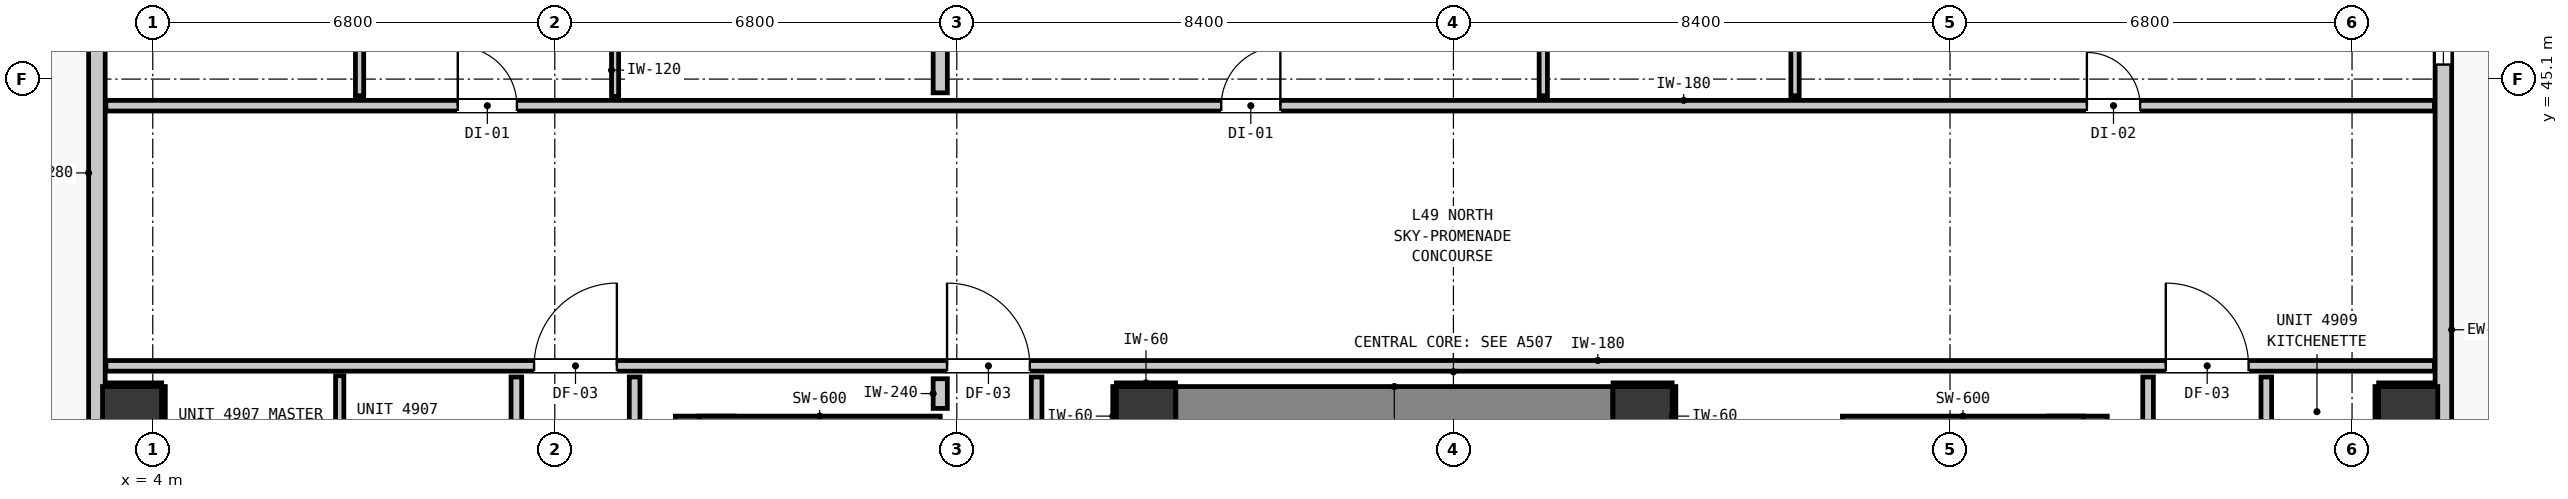
"""IFC4 building model, lengths in metres.
Left out: names, types, materials, properties, quantities, classifications, styles, units other than length and angle.
Written with IfcOpenShell. Run it as: python <this file> out.ifc"""

import sys

from ifc_helpers import new_model, si_unit, direction, frame, frame_2d, origin, origin_2d, place, context, subcontext, project, spatial, rectangle, extrude, element, fill, save


model = new_model("IFC4")
c1 = context("Model", 3, precision=1e-05, world=origin(), true_north=direction((0.0, 1.0)))
c2 = subcontext(c1, "Body", "Model", "MODEL_VIEW")
j1 = project(units=[si_unit("LENGTHUNIT", "METRE"), si_unit("PLANEANGLEUNIT", "RADIAN")], contexts=[c1])
p1 = place(None, origin())
s1 = spatial("IfcSite", under=j1, at=p1, CompositionType="ELEMENT")
p2 = place(p1, origin())
s2 = spatial("IfcBuilding", under=s1, at=p2, CompositionType="ELEMENT")
p3 = place(p2, frame((0.0, 0.0, 169.16)))
s3 = spatial("IfcBuildingStorey", under=s2, at=p3, CompositionType="ELEMENT", Elevation=169.16)
for number, where, z_axis, x_axis in (
    (1, (20.8, 39.4, 0.0), (0.0, 0.0, 1.0), (1.0, 0.0, 0.0)),
    (2, (29.2, 39.4, 0.0), (0.0, 0.0, 1.0), (1.0, 0.0, 0.0)),
):
    element("IfcColumn", number, at=place(p3, frame(where, z_axis=z_axis, x_axis=x_axis)), inside=s3, PredefinedType="COLUMN", context=c2, shape_type="SweptSolid", body=[
        extrude(rectangle(XDim=1.0, YDim=1.0, at=origin_2d()), origin(), (0.0, 0.0, 1.0), 3.32),
    ])
p4 = place(p3, frame((13.34, 31.205, 0.0), z_axis=(0.0, 0.0, 1.0), x_axis=(0.0, 1.0, 0.0)))
e3 = element("IfcWall", 3, at=p4, inside=s3, PredefinedType="SHEAR", context=c2, shape_type="SweptSolid", body=[
    extrude(rectangle(XDim=8.195, YDim=1.0, at=frame_2d((4.097, 0.0))), origin(), (0.0, 0.0, 1.0), 3.32),
])
p5 = place(p3, frame((13.24, 39.1, 0.0), z_axis=(0.0, 0.0, 1.0), x_axis=(1.0, 0.0, 0.0)))
e4 = element("IfcWall", 4, at=p5, inside=s3, PredefinedType="SHEAR", context=c2, shape_type="SweptSolid", body=[
    extrude(rectangle(XDim=4.08, YDim=0.6, at=frame_2d((2.04, 0.0))), origin(), (0.0, 0.0, 1.0), 3.32),
])
p6 = place(p3, frame((36.56, 31.205, 0.0), z_axis=(0.0, 0.0, 1.0), x_axis=(0.0, 1.0, 0.0)))
e5 = element("IfcWall", 5, at=p6, inside=s3, PredefinedType="SHEAR", context=c2, shape_type="SweptSolid", body=[
    extrude(rectangle(XDim=8.195, YDim=1.0, at=frame_2d((4.097, 0.0))), origin(), (0.0, 0.0, 1.0), 3.32),
])
p7 = place(p3, frame((32.58, 39.1, 0.0), z_axis=(0.0, 0.0, 1.0), x_axis=(1.0, 0.0, 0.0)))
e6 = element("IfcWall", 6, at=p7, inside=s3, PredefinedType="SHEAR", context=c2, shape_type="SweptSolid", body=[
    extrude(rectangle(XDim=4.08, YDim=0.6, at=frame_2d((2.04, 0.0))), origin(), (0.0, 0.0, 1.0), 3.32),
])
p8 = place(p3, frame((21.305, 39.4, 0.0), z_axis=(0.0, 0.0, 1.0), x_axis=(1.0, 0.0, 0.0)))
e7 = element("IfcWall", 7, at=p8, inside=s3, PredefinedType="SHEAR", context=c2, shape_type="SweptSolid", body=[
    extrude(rectangle(XDim=7.39, YDim=1.0, at=frame_2d((3.695, 0.0))), origin(), (0.0, 0.0, 1.0), 3.32),
])
for number, where, z_axis, x_axis in (
    (8, (3.65, 39.4, 0.0), (0.0, 0.0, 1.0), (1.0, 0.0, 0.0)),
    (9, (42.15, 39.4, 0.0), (0.0, 0.0, 1.0), (1.0, 0.0, 0.0)),
):
    element("IfcColumn", number, at=place(p3, frame(where, z_axis=z_axis, x_axis=x_axis)), inside=s3, PredefinedType="COLUMN", context=c2, shape_type="SweptSolid", body=[
        extrude(rectangle(XDim=1.0, YDim=1.0, at=origin_2d()), origin(), (0.0, 0.0, 1.0), 3.32),
    ])
p9 = place(p3, frame((3.055, 17.555, 0.0), z_axis=(0.0, 0.0, 1.0), x_axis=(0.0, 1.0, 0.0)))
e10 = element("IfcWall", 10, at=p9, inside=s3, PredefinedType="STANDARD", context=c2, shape_type="SweptSolid", body=[
    extrude(rectangle(XDim=32.29, YDim=0.28, at=frame_2d((16.145, 0.0))), origin(), (0.0, 0.0, 1.0), 2.96),
])
p10 = place(p9, frame((6.871, 0.0, 0.0)))
e11 = element("IfcOpeningElement", 11, at=p10, cuts=e10, PredefinedType="OPENING", context=c2, shape_type="SweptSolid", body=[
    extrude(rectangle(XDim=1.0, YDim=2.15, at=frame_2d((0.5, 1.075))), frame((0.0, 0.15, 0.0), z_axis=(0.0, -1.0, 0.0), x_axis=(1.0, 0.0, 0.0)), (0.0, 0.0, 1.0), 0.3),
])
p11 = place(p9, frame((30.753, 0.0, 0.85)))
e12 = element("IfcOpeningElement", 12, at=p11, cuts=e10, PredefinedType="OPENING", context=c2, shape_type="SweptSolid", body=[
    extrude(rectangle(XDim=1.05, YDim=1.65, at=frame_2d((0.525, 0.825))), frame((0.0, 0.15, 0.0), z_axis=(0.0, -1.0, 0.0), x_axis=(1.0, 0.0, 0.0)), (0.0, 0.0, 1.0), 0.3),
])
p12 = place(p9, frame((8.6, 0.0, 0.85)))
e13 = element("IfcOpeningElement", 13, at=p12, cuts=e10, PredefinedType="OPENING", context=c2, shape_type="SweptSolid", body=[
    extrude(rectangle(XDim=1.05, YDim=1.65, at=frame_2d((0.525, 0.825))), frame((0.0, 0.15, 0.0), z_axis=(0.0, -1.0, 0.0), x_axis=(1.0, 0.0, 0.0)), (0.0, 0.0, 1.0), 0.3),
])
p13 = place(p9, frame((10.612, 0.0, 0.85)))
e14 = element("IfcOpeningElement", 14, at=p13, cuts=e10, PredefinedType="OPENING", context=c2, shape_type="SweptSolid", body=[
    extrude(rectangle(XDim=1.8, YDim=1.9, at=frame_2d((0.9, 0.95))), frame((0.0, 0.15, 0.0), z_axis=(0.0, -1.0, 0.0), x_axis=(1.0, 0.0, 0.0)), (0.0, 0.0, 1.0), 0.3),
])
p14 = place(p9, frame((16.925, 0.0, 0.85)))
e15 = element("IfcOpeningElement", 15, at=p14, cuts=e10, PredefinedType="OPENING", context=c2, shape_type="SweptSolid", body=[
    extrude(rectangle(XDim=1.8, YDim=1.9, at=frame_2d((0.9, 0.95))), frame((0.0, 0.15, 0.0), z_axis=(0.0, -1.0, 0.0), x_axis=(1.0, 0.0, 0.0)), (0.0, 0.0, 1.0), 0.3),
])
p15 = place(p9, frame((20.113, 0.0, 0.85)))
e16 = element("IfcOpeningElement", 16, at=p15, cuts=e10, PredefinedType="OPENING", context=c2, shape_type="SweptSolid", body=[
    extrude(rectangle(XDim=1.05, YDim=1.65, at=frame_2d((0.525, 0.825))), frame((0.0, 0.15, 0.0), z_axis=(0.0, -1.0, 0.0), x_axis=(1.0, 0.0, 0.0)), (0.0, 0.0, 1.0), 0.3),
])
p16 = place(p3, frame((42.745, 49.845, 0.0), z_axis=(0.0, 0.0, 1.0), x_axis=(0.0, -1.0, 0.0)))
e17 = element("IfcWall", 17, at=p16, inside=s3, PredefinedType="STANDARD", context=c2, shape_type="SweptSolid", body=[
    extrude(rectangle(XDim=32.29, YDim=0.28, at=frame_2d((16.145, 0.0))), origin(), (0.0, 0.0, 1.0), 2.96),
])
p17 = place(p16, frame((0.904, 0.0, 0.0)))
e18 = element("IfcOpeningElement", 18, at=p17, cuts=e17, PredefinedType="OPENING", context=c2, shape_type="SweptSolid", body=[
    extrude(rectangle(XDim=1.0, YDim=2.15, at=frame_2d((0.5, 1.075))), frame((0.0, 0.15, 0.0), z_axis=(0.0, -1.0, 0.0), x_axis=(1.0, 0.0, 0.0)), (0.0, 0.0, 1.0), 0.3),
])
p18 = place(p16, frame((2.699, 0.0, 0.85)))
e19 = element("IfcOpeningElement", 19, at=p18, cuts=e17, PredefinedType="OPENING", context=c2, shape_type="SweptSolid", body=[
    extrude(rectangle(XDim=1.8, YDim=1.9, at=frame_2d((0.9, 0.95))), frame((0.0, 0.15, 0.0), z_axis=(0.0, -1.0, 0.0), x_axis=(1.0, 0.0, 0.0)), (0.0, 0.0, 1.0), 0.3),
])
p19 = place(p16, frame((23.02, 0.0, 0.85)))
e20 = element("IfcOpeningElement", 20, at=p19, cuts=e17, PredefinedType="OPENING", context=c2, shape_type="SweptSolid", body=[
    extrude(rectangle(XDim=1.8, YDim=1.9, at=frame_2d((0.9, 0.95))), frame((0.0, 0.15, 0.0), z_axis=(0.0, -1.0, 0.0), x_axis=(1.0, 0.0, 0.0)), (0.0, 0.0, 1.0), 0.3),
])
p20 = place(p16, frame((13.47, 0.0, 0.85)))
e21 = element("IfcOpeningElement", 21, at=p20, cuts=e17, PredefinedType="OPENING", context=c2, shape_type="SweptSolid", body=[
    extrude(rectangle(XDim=1.8, YDim=1.9, at=frame_2d((0.9, 0.95))), frame((0.0, 0.15, 0.0), z_axis=(0.0, -1.0, 0.0), x_axis=(1.0, 0.0, 0.0)), (0.0, 0.0, 1.0), 0.3),
])
p21 = place(p3, frame((3.207, 40.25, 0.0), z_axis=(0.0, 0.0, 1.0), x_axis=(1.0, 0.0, 0.0)))
e22 = element("IfcWall", 22, at=p21, inside=s3, PredefinedType="PARTITIONING", context=c2, shape_type="SweptSolid", body=[
    extrude(rectangle(XDim=39.386, YDim=0.18, at=frame_2d((19.693, 0.0))), origin(), (0.0, 0.0, 1.0), 2.96),
])
p22 = place(p21, frame((14.228, 0.0, 0.0)))
e23 = element("IfcOpeningElement", 23, at=p22, cuts=e22, PredefinedType="OPENING", context=c2, shape_type="SweptSolid", body=[
    extrude(rectangle(XDim=1.4, YDim=2.15, at=frame_2d((0.7, 1.075))), frame((0.0, 0.1, 0.0), z_axis=(0.0, -1.0, 0.0), x_axis=(1.0, 0.0, 0.0)), (0.0, 0.0, 1.0), 0.2),
])
p23 = place(p21, frame((7.243, 0.0, 0.0)))
e24 = element("IfcOpeningElement", 24, at=p23, cuts=e22, PredefinedType="OPENING", context=c2, shape_type="SweptSolid", body=[
    extrude(rectangle(XDim=1.4, YDim=2.15, at=frame_2d((0.7, 1.075))), frame((0.0, 0.1, 0.0), z_axis=(0.0, -1.0, 0.0), x_axis=(1.0, 0.0, 0.0)), (0.0, 0.0, 1.0), 0.2),
])
p24 = place(p21, frame((34.843, 0.0, 0.0)))
e25 = element("IfcOpeningElement", 25, at=p24, cuts=e22, PredefinedType="OPENING", context=c2, shape_type="SweptSolid", body=[
    extrude(rectangle(XDim=1.4, YDim=2.15, at=frame_2d((0.7, 1.075))), frame((0.0, 0.1, 0.0), z_axis=(0.0, -1.0, 0.0), x_axis=(1.0, 0.0, 0.0)), (0.0, 0.0, 1.0), 0.2),
])
p25 = place(p3, frame((3.207, 44.65, 0.0), z_axis=(0.0, 0.0, 1.0), x_axis=(1.0, 0.0, 0.0)))
e26 = element("IfcWall", 26, at=p25, inside=s3, PredefinedType="PARTITIONING", context=c2, shape_type="SweptSolid", body=[
    extrude(rectangle(XDim=39.386, YDim=0.18, at=frame_2d((19.693, 0.0))), origin(), (0.0, 0.0, 1.0), 2.96),
])
p26 = place(p25, frame((5.952, 0.0, 0.0)))
e27 = element("IfcOpeningElement", 27, at=p26, cuts=e26, PredefinedType="OPENING", context=c2, shape_type="SweptSolid", body=[
    extrude(rectangle(XDim=1.0, YDim=2.15, at=frame_2d((0.5, 1.075))), frame((0.0, 0.1, 0.0), z_axis=(0.0, -1.0, 0.0), x_axis=(1.0, 0.0, 0.0)), (0.0, 0.0, 1.0), 0.2),
])
p27 = place(p25, frame((18.866, 0.0, 0.0)))
e28 = element("IfcOpeningElement", 28, at=p27, cuts=e26, PredefinedType="OPENING", context=c2, shape_type="SweptSolid", body=[
    extrude(rectangle(XDim=1.0, YDim=2.15, at=frame_2d((0.5, 1.075))), frame((0.0, 0.1, 0.0), z_axis=(0.0, -1.0, 0.0), x_axis=(1.0, 0.0, 0.0)), (0.0, 0.0, 1.0), 0.2),
])
p28 = place(p25, frame((33.508, 0.0, 0.0)))
e29 = element("IfcOpeningElement", 29, at=p28, cuts=e26, PredefinedType="OPENING", context=c2, shape_type="SweptSolid", body=[
    extrude(rectangle(XDim=0.9, YDim=2.1, at=frame_2d((0.45, 1.05))), frame((0.0, 0.1, 0.0), z_axis=(0.0, -1.0, 0.0), x_axis=(1.0, 0.0, 0.0)), (0.0, 0.0, 1.0), 0.2),
])
p29 = place(p3, frame((17.32, 39.53, 0.0), z_axis=(0.0, 0.0, 1.0), x_axis=(0.0, 1.0, 0.0)))
e30 = element("IfcWall", 30, at=p29, inside=s3, PredefinedType="PARTITIONING", context=c2, shape_type="SweptSolid", body=[
    extrude(rectangle(XDim=0.502, YDim=0.24, at=frame_2d((0.251, 0.0))), origin(), (0.0, 0.0, 1.0), 2.96),
])
p30 = place(p3, frame((17.32, 44.868, 0.0), z_axis=(0.0, 0.0, 1.0), x_axis=(0.0, 1.0, 0.0)))
e31 = element("IfcWall", 31, at=p30, inside=s3, PredefinedType="PARTITIONING", context=c2, shape_type="SweptSolid", body=[
    extrude(rectangle(XDim=2.744, YDim=0.24, at=frame_2d((1.372, 0.0))), origin(), (0.0, 0.0, 1.0), 2.96),
])
p31 = place(p3, frame((10.15, 37.553, 0.0), z_axis=(0.0, 0.0, 1.0), x_axis=(0.0, 1.0, 0.0)))
e32 = element("IfcWall", 32, at=p31, inside=s3, PredefinedType="PARTITIONING", context=c2, shape_type="SweptSolid", body=[
    extrude(rectangle(XDim=2.509, YDim=0.18, at=frame_2d((1.254, 0.0))), origin(), (0.0, 0.0, 1.0), 2.96),
])
p32 = place(p3, frame((12.15, 21.368, 0.0), z_axis=(0.0, 0.0, 1.0), x_axis=(0.0, 1.0, 0.0)))
e33 = element("IfcWall", 33, at=p32, inside=s3, PredefinedType="PARTITIONING", context=c2, shape_type="SweptSolid", body=[
    extrude(rectangle(XDim=18.694, YDim=0.18, at=frame_2d((9.347, 0.0))), origin(), (0.0, 0.0, 1.0), 2.96),
])
p33 = place(p3, frame((18.95, 39.058, 0.0), z_axis=(0.0, 0.0, 1.0), x_axis=(0.0, 1.0, 0.0)))
e34 = element("IfcWall", 34, at=p33, inside=s3, PredefinedType="PARTITIONING", context=c2, shape_type="SweptSolid", body=[
    extrude(rectangle(XDim=1.004, YDim=0.18, at=frame_2d((0.502, 0.0))), origin(), (0.0, 0.0, 1.0), 2.96),
])
p34 = place(p3, frame((37.75, 21.368, 0.0), z_axis=(0.0, 0.0, 1.0), x_axis=(0.0, 1.0, 0.0)))
e35 = element("IfcWall", 35, at=p34, inside=s3, PredefinedType="PARTITIONING", context=c2, shape_type="SweptSolid", body=[
    extrude(rectangle(XDim=18.694, YDim=0.18, at=frame_2d((9.347, 0.0))), origin(), (0.0, 0.0, 1.0), 2.96),
])
p35 = place(p3, frame((39.75, 37.553, 0.0), z_axis=(0.0, 0.0, 1.0), x_axis=(0.0, 1.0, 0.0)))
e36 = element("IfcWall", 36, at=p35, inside=s3, PredefinedType="PARTITIONING", context=c2, shape_type="SweptSolid", body=[
    extrude(rectangle(XDim=2.509, YDim=0.18, at=frame_2d((1.254, 0.0))), origin(), (0.0, 0.0, 1.0), 2.96),
])
p36 = place(p3, frame((7.162, 37.533, 0.0), z_axis=(0.0, 0.0, 1.0), x_axis=(0.0, 1.0, 0.0)))
e37 = element("IfcWall", 37, at=p36, inside=s3, PredefinedType="PARTITIONING", context=c2, shape_type="SweptSolid", body=[
    extrude(rectangle(XDim=2.549, YDim=0.14, at=frame_2d((1.274, 0.0))), origin(), (0.0, 0.0, 1.0), 2.96),
])
p37 = place(p3, frame((7.498, 44.818, 0.0), z_axis=(0.0, 0.0, 1.0), x_axis=(0.0, 1.0, 0.0)))
e38 = element("IfcWall", 38, at=p37, inside=s3, PredefinedType="PARTITIONING", context=c2, shape_type="SweptSolid", body=[
    extrude(rectangle(XDim=2.844, YDim=0.14, at=frame_2d((1.422, 0.0))), origin(), (0.0, 0.0, 1.0), 2.96),
])
p38 = place(p37, frame((0.995, 0.0, 0.0)))
e39 = element("IfcOpeningElement", 39, at=p38, cuts=e38, PredefinedType="OPENING", context=c2, shape_type="SweptSolid", body=[
    extrude(rectangle(XDim=0.86, YDim=2.02, at=frame_2d((0.43, 1.01))), frame((0.0, 0.08, 0.0), z_axis=(0.0, -1.0, 0.0), x_axis=(1.0, 0.0, 0.0)), (0.0, 0.0, 1.0), 0.16),
])
p39 = place(p3, frame((27.52, 44.818, 0.0), z_axis=(0.0, 0.0, 1.0), x_axis=(0.0, 1.0, 0.0)))
e40 = element("IfcWall", 40, at=p39, inside=s3, PredefinedType="PARTITIONING", context=c2, shape_type="SweptSolid", body=[
    extrude(rectangle(XDim=7.175, YDim=0.14, at=frame_2d((3.587, 0.0))), origin(), (0.0, 0.0, 1.0), 2.96),
])
p40 = place(p39, frame((0.975, 0.0, 0.0)))
e41 = element("IfcOpeningElement", 41, at=p40, cuts=e40, PredefinedType="OPENING", context=c2, shape_type="SweptSolid", body=[
    extrude(rectangle(XDim=0.9, YDim=2.1, at=frame_2d((0.45, 1.05))), frame((0.0, 0.08, 0.0), z_axis=(0.0, -1.0, 0.0), x_axis=(1.0, 0.0, 0.0)), (0.0, 0.0, 1.0), 0.16),
])
p41 = place(p39, frame((4.644, 0.0, 0.0)))
e42 = element("IfcOpeningElement", 42, at=p41, cuts=e40, PredefinedType="OPENING", context=c2, shape_type="SweptSolid", body=[
    extrude(rectangle(XDim=0.86, YDim=2.02, at=frame_2d((0.43, 1.01))), frame((0.0, 0.08, 0.0), z_axis=(0.0, -1.0, 0.0), x_axis=(1.0, 0.0, 0.0)), (0.0, 0.0, 1.0), 0.16),
])
p42 = place(p3, frame((31.778, 44.818, 0.0), z_axis=(0.0, 0.0, 1.0), x_axis=(0.0, 1.0, 0.0)))
e43 = element("IfcWall", 43, at=p42, inside=s3, PredefinedType="PARTITIONING", context=c2, shape_type="SweptSolid", body=[
    extrude(rectangle(XDim=2.844, YDim=0.14, at=frame_2d((1.422, 0.0))), origin(), (0.0, 0.0, 1.0), 2.96),
])
p43 = place(p3, frame((11.82, 44.808, 0.0), z_axis=(0.0, 0.0, 1.0), x_axis=(0.0, 1.0, 0.0)))
e44 = element("IfcWall", 44, at=p43, inside=s3, PredefinedType="PARTITIONING", context=c2, shape_type="SweptSolid", body=[
    extrude(rectangle(XDim=2.864, YDim=0.12, at=frame_2d((1.432, 0.0))), origin(), (0.0, 0.0, 1.0), 2.96),
])
p44 = place(p43, frame((0.985, 0.0, 0.0)))
e45 = element("IfcOpeningElement", 45, at=p44, cuts=e44, PredefinedType="OPENING", context=c2, shape_type="SweptSolid", body=[
    extrude(rectangle(XDim=0.9, YDim=2.1, at=frame_2d((0.45, 1.05))), frame((0.0, 0.07, 0.0), z_axis=(0.0, -1.0, 0.0), x_axis=(1.0, 0.0, 0.0)), (0.0, 0.0, 1.0), 0.14),
])
for number, where, z_axis, x_axis in (
    (46, (20.3, 39.932, 0.0), (0.0, 0.0, 1.0), (1.0, 0.0, 0.0)),
    (47, (20.268, 38.9, 0.0), (0.0, 0.0, 1.0), (0.0, 1.0, 0.0)),
    (48, (28.7, 39.932, 0.0), (0.0, 0.0, 1.0), (1.0, 0.0, 0.0)),
    (49, (29.732, 38.9, 0.0), (0.0, 0.0, 1.0), (0.0, 1.0, 0.0)),
):
    element("IfcWall", number, at=place(p3, frame(where, z_axis=z_axis, x_axis=x_axis)), inside=s3, PredefinedType="PARTITIONING", context=c2, shape_type="SweptSolid", body=[
        extrude(rectangle(XDim=1.0, YDim=0.06, at=frame_2d((0.5, 0.0))), origin(), (0.0, 0.0, 1.0), 1.45),
    ])
p45 = place(p3, frame((3.21, 39.932, 0.0), z_axis=(0.0, 0.0, 1.0), x_axis=(1.0, 0.0, 0.0)))
e50 = element("IfcWall", 50, at=p45, inside=s3, PredefinedType="PARTITIONING", context=c2, shape_type="SweptSolid", body=[
    extrude(rectangle(XDim=0.94, YDim=0.06, at=frame_2d((0.47, 0.0))), origin(), (0.0, 0.0, 1.0), 1.45),
])
p46 = place(p3, frame((4.182, 38.9, 0.0), z_axis=(0.0, 0.0, 1.0), x_axis=(0.0, 1.0, 0.0)))
e51 = element("IfcWall", 51, at=p46, inside=s3, PredefinedType="PARTITIONING", context=c2, shape_type="SweptSolid", body=[
    extrude(rectangle(XDim=1.0, YDim=0.06, at=frame_2d((0.5, 0.0))), origin(), (0.0, 0.0, 1.0), 1.45),
])
p47 = place(p3, frame((41.65, 39.932, 0.0), z_axis=(0.0, 0.0, 1.0), x_axis=(1.0, 0.0, 0.0)))
e52 = element("IfcWall", 52, at=p47, inside=s3, PredefinedType="PARTITIONING", context=c2, shape_type="SweptSolid", body=[
    extrude(rectangle(XDim=0.94, YDim=0.06, at=frame_2d((0.47, 0.0))), origin(), (0.0, 0.0, 1.0), 1.45),
])
p48 = place(p3, frame((41.618, 38.9, 0.0), z_axis=(0.0, 0.0, 1.0), x_axis=(0.0, 1.0, 0.0)))
e53 = element("IfcWall", 53, at=p48, inside=s3, PredefinedType="PARTITIONING", context=c2, shape_type="SweptSolid", body=[
    extrude(rectangle(XDim=1.0, YDim=0.06, at=frame_2d((0.5, 0.0))), origin(), (0.0, 0.0, 1.0), 1.45),
])
p49 = place(p18, origin())
e54 = element("IfcWindow", 54, at=p49, inside=s3, PartitioningType="SINGLE_PANEL", PredefinedType="WINDOW", context=c2, shape_type="SweptSolid", body=[
    extrude(rectangle(XDim=1.8, YDim=1.9, at=frame_2d((0.9, 0.95))), frame((0.0, 0.03, 0.0), z_axis=(0.0, -1.0, 0.0), x_axis=(1.0, 0.0, 0.0)), (0.0, 0.0, 1.0), 0.06),
])
fill(e19, e54)
p50 = place(p22, origin())
e55 = element("IfcDoor", 55, at=p50, inside=s3, OperationType="SINGLE_SWING_LEFT", PredefinedType="DOOR", context=c2, shape_type="SweptSolid", body=[
    extrude(rectangle(XDim=1.4, YDim=2.15, at=frame_2d((0.7, 1.075))), frame((0.0, 0.025, 0.0), z_axis=(0.0, -1.0, 0.0), x_axis=(1.0, 0.0, 0.0)), (0.0, 0.0, 1.0), 0.05),
])
fill(e23, e55)
p51 = place(p23, origin())
e56 = element("IfcDoor", 56, at=p51, inside=s3, OperationType="SINGLE_SWING_RIGHT", PredefinedType="DOOR", context=c2, shape_type="SweptSolid", body=[
    extrude(rectangle(XDim=1.4, YDim=2.15, at=frame_2d((0.7, 1.075))), frame((0.0, 0.025, 0.0), z_axis=(0.0, -1.0, 0.0), x_axis=(1.0, 0.0, 0.0)), (0.0, 0.0, 1.0), 0.05),
])
fill(e24, e56)
p52 = place(p24, origin())
e57 = element("IfcDoor", 57, at=p52, inside=s3, OperationType="SINGLE_SWING_LEFT", PredefinedType="DOOR", context=c2, shape_type="SweptSolid", body=[
    extrude(rectangle(XDim=1.4, YDim=2.15, at=frame_2d((0.7, 1.075))), frame((0.0, 0.025, 0.0), z_axis=(0.0, -1.0, 0.0), x_axis=(1.0, 0.0, 0.0)), (0.0, 0.0, 1.0), 0.05),
])
fill(e25, e57)
p53 = place(p26, origin())
e58 = element("IfcDoor", 58, at=p53, inside=s3, OperationType="SINGLE_SWING_LEFT", PredefinedType="DOOR", context=c2, shape_type="SweptSolid", body=[
    extrude(rectangle(XDim=1.0, YDim=2.15, at=frame_2d((0.5, 1.075))), frame((0.0, 0.025, 0.0), z_axis=(0.0, -1.0, 0.0), x_axis=(1.0, 0.0, 0.0)), (0.0, 0.0, 1.0), 0.05),
])
fill(e27, e58)
p54 = place(p27, origin())
e59 = element("IfcDoor", 59, at=p54, inside=s3, OperationType="SINGLE_SWING_RIGHT", PredefinedType="DOOR", context=c2, shape_type="SweptSolid", body=[
    extrude(rectangle(XDim=1.0, YDim=2.15, at=frame_2d((0.5, 1.075))), frame((0.0, 0.025, 0.0), z_axis=(0.0, -1.0, 0.0), x_axis=(1.0, 0.0, 0.0)), (0.0, 0.0, 1.0), 0.05),
])
fill(e28, e59)
p55 = place(p28, origin())
e60 = element("IfcDoor", 60, at=p55, inside=s3, OperationType="SINGLE_SWING_LEFT", PredefinedType="DOOR", context=c2, shape_type="SweptSolid", body=[
    extrude(rectangle(XDim=0.9, YDim=2.1, at=frame_2d((0.45, 1.05))), frame((0.0, 0.025, 0.0), z_axis=(0.0, -1.0, 0.0), x_axis=(1.0, 0.0, 0.0)), (0.0, 0.0, 1.0), 0.05),
])
fill(e29, e60)
save(model, sys.argv[1])
